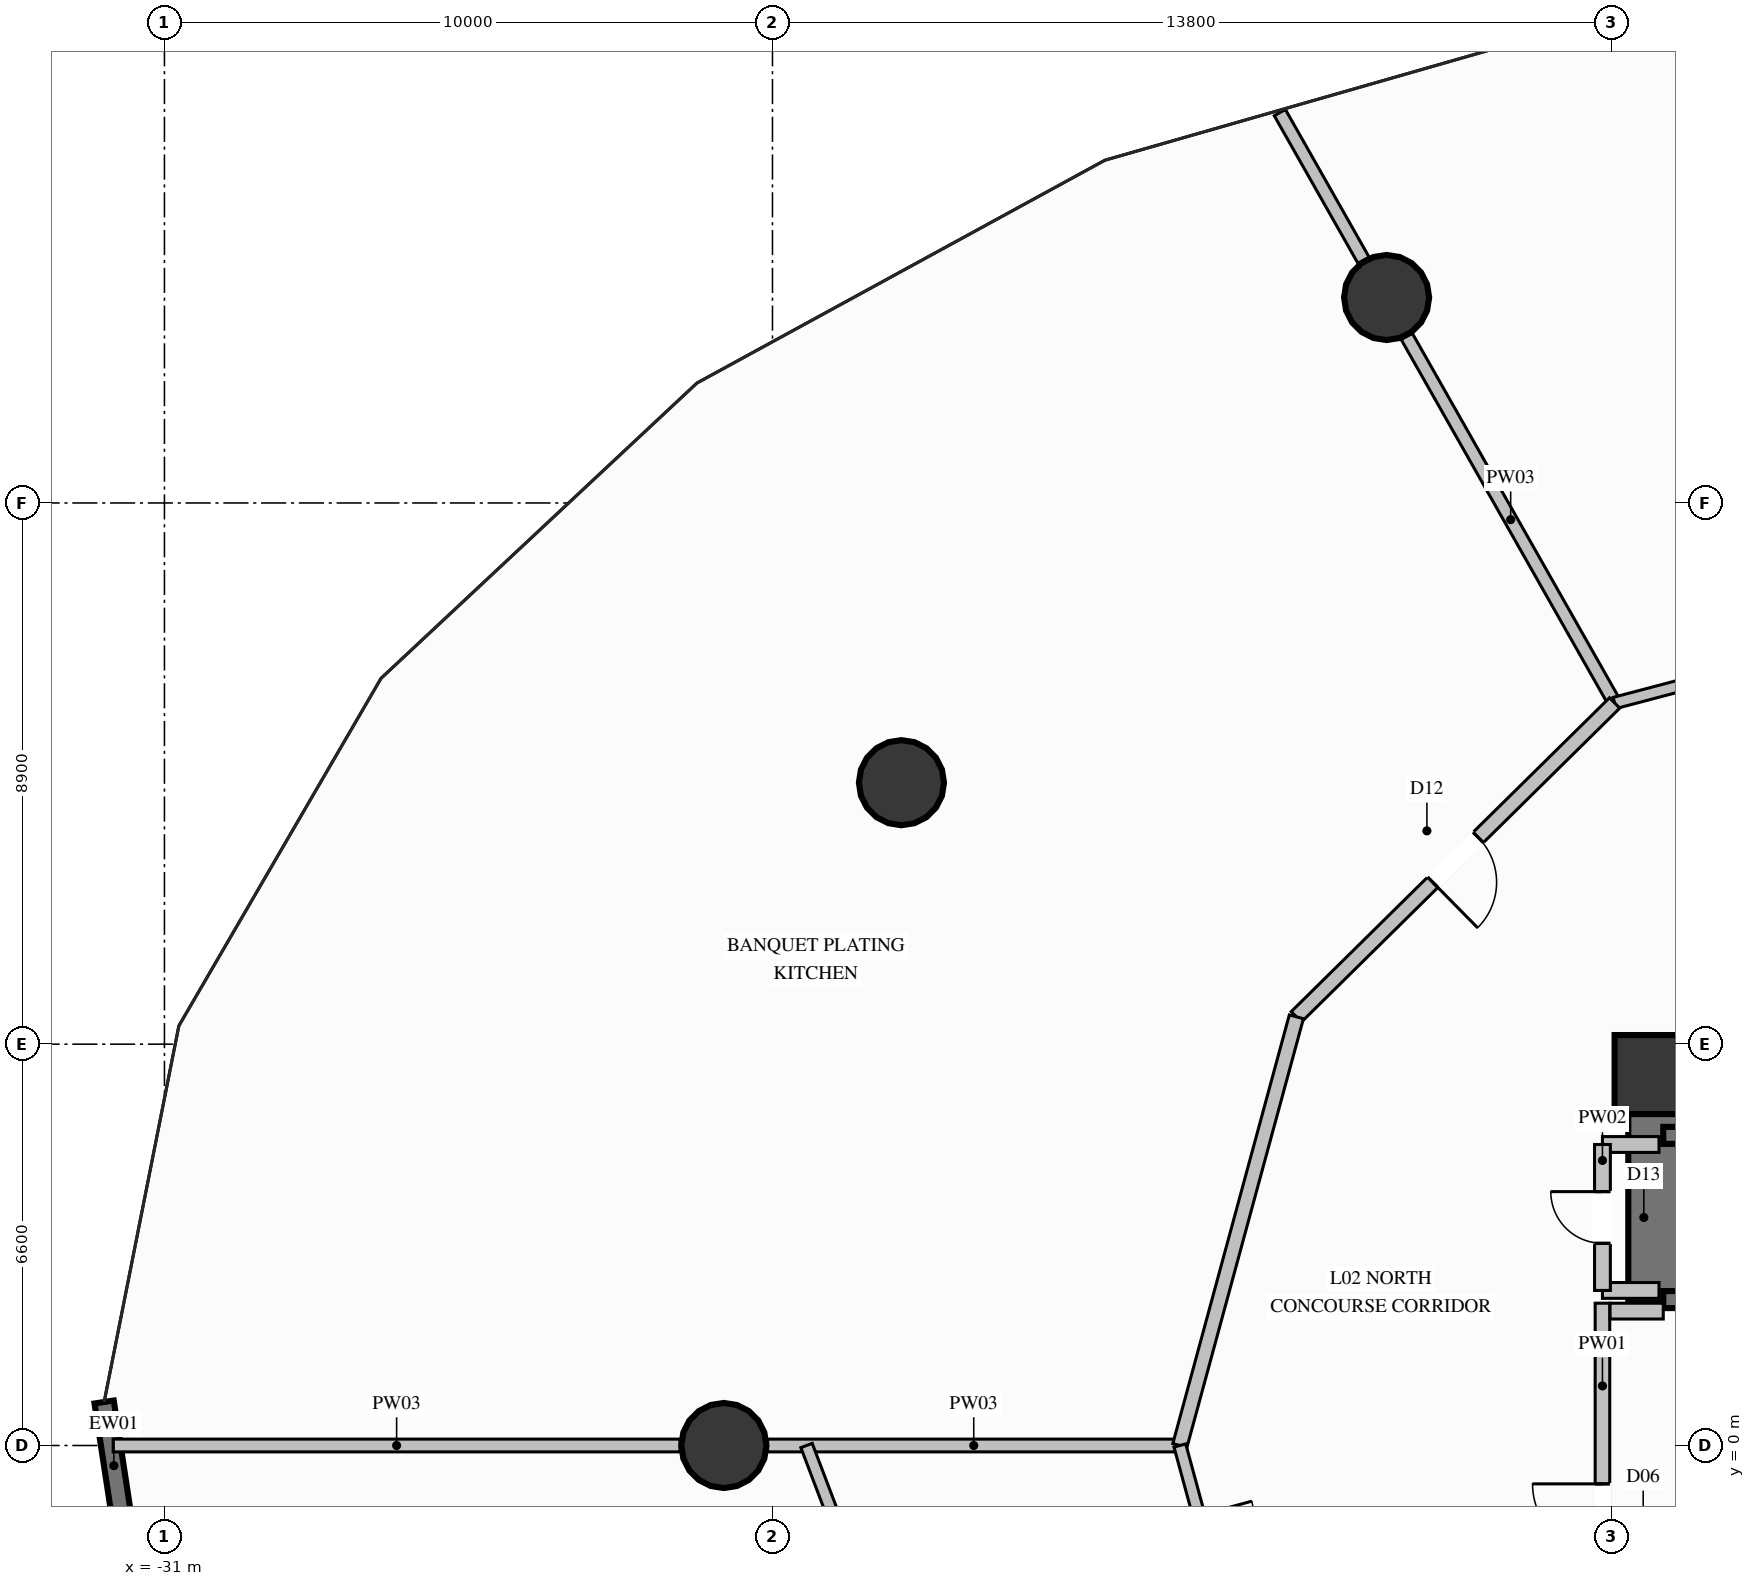
"""IFC4 building model, lengths in metres.
Left out: names, types, materials, properties, quantities, classifications, styles, units other than length and angle.
Written with IfcOpenShell. Run it as: python <this file> out.ifc"""

import sys

from ifc_helpers import new_model, si_unit, direction, frame, frame_2d, origin, origin_2d, place, context, subcontext, project, spatial, rectangle, circle, extrude, element, fill, save


model = new_model("IFC4")
c1 = context("Model", 3, precision=1e-05, world=origin(), true_north=direction((0.0, 1.0)))
c2 = subcontext(c1, "Body", "Model", "MODEL_VIEW")
j1 = project(units=[si_unit("LENGTHUNIT", "METRE"), si_unit("PLANEANGLEUNIT", "RADIAN")], contexts=[c1])
p1 = place(None, origin())
s1 = spatial("IfcSite", under=j1, at=p1, CompositionType="ELEMENT")
p2 = place(p1, origin())
s2 = spatial("IfcBuilding", under=s1, at=p2, CompositionType="ELEMENT")
p3 = place(p2, frame((0.0, 0.0, 12.6)))
s3 = spatial("IfcBuildingStorey", under=s2, at=p3, CompositionType="ELEMENT", Elevation=12.6)
p4 = place(p3, frame((-6.5, 6.1, 0.0), z_axis=(0.0, 0.0, 1.0), x_axis=(1.0, 0.0, 0.0)))
e1 = element("IfcColumn", 1, at=p4, inside=s3, PredefinedType="COLUMN", context=c2, shape_type="SweptSolid", body=[
    extrude(rectangle(XDim=1.3, YDim=1.3, at=origin_2d()), origin(), (0.0, 0.0, 1.0), 6.0),
])
p5 = place(p3, frame((-6.5, 2.35, 0.0), z_axis=(0.0, 0.0, 1.0), x_axis=(0.0, 1.0, 0.0)))
e2 = element("IfcWall", 2, at=p5, inside=s3, PredefinedType="SHEAR", context=c2, shape_type="SweptSolid", body=[
    extrude(rectangle(XDim=4.175, YDim=0.85, at=frame_2d((2.087, 0.0))), origin(), (0.0, 0.0, 1.0), 6.0),
])
for number, where, z_axis, x_axis in (
    (3, (-10.9, 18.879, 0.0), (0.0, 0.0, 1.0), (1.0, 0.0, 0.0)),
    (4, (-18.879, 10.9, 0.0), (0.0, 0.0, 1.0), (1.0, 0.0, 0.0)),
    (5, (-21.8, 0.0, 0.0), (0.0, 0.0, 1.0), (1.0, 0.0, 0.0)),
):
    element("IfcColumn", number, at=place(p3, frame(where, z_axis=z_axis, x_axis=x_axis)), inside=s3, PredefinedType="COLUMN", context=c2, shape_type="SweptSolid", body=[
        extrude(circle(Radius=0.7, at=origin_2d()), origin(), (0.0, 0.0, 1.0), 6.0),
    ])
p6 = place(p3, frame((-31.041, -5.52, 0.0), z_axis=(0.0, 0.0, 1.0), x_axis=(-0.150768496596, 0.988569097451, 0.0)))
e6 = element("IfcWall", 6, at=p6, inside=s3, PredefinedType="SOLIDWALL", context=c2, shape_type="SweptSolid", body=[
    extrude(rectangle(XDim=6.307, YDim=0.32, at=frame_2d((3.154, 0.0))), origin(), (0.0, 0.0, 1.0), 5.64),
])
p7 = place(p6, frame((1.539, 0.0, 0.65)))
e7 = element("IfcOpeningElement", 7, at=p7, cuts=e6, PredefinedType="OPENING", context=c2, shape_type="SweptSolid", body=[
    extrude(rectangle(XDim=2.4, YDim=3.2, at=frame_2d((1.2, 1.6))), frame((0.0, 0.17, 0.0), z_axis=(0.0, -1.0, 0.0), x_axis=(1.0, 0.0, 0.0)), (0.0, 0.0, 1.0), 0.34),
])
p8 = place(p3, frame((-6.35, 2.4, 0.0), z_axis=(0.0, 0.0, 1.0), x_axis=(1.0, 0.0, 0.0)))
e8 = element("IfcWall", 8, at=p8, inside=s3, PredefinedType="SOLIDWALL", context=c2, shape_type="SweptSolid", body=[
    extrude(rectangle(XDim=2.2, YDim=0.28, at=frame_2d((1.1, 0.0))), origin(), (0.0, 0.0, 1.0), 5.64),
])
p9 = place(p8, frame((0.5, 0.0, 0.0)))
e9 = element("IfcOpeningElement", 9, at=p9, cuts=e8, PredefinedType="OPENING", context=c2, shape_type="SweptSolid", body=[
    extrude(rectangle(XDim=1.2, YDim=2.2, at=frame_2d((0.6, 1.1))), frame((0.0, 0.15, 0.0), z_axis=(0.0, -1.0, 0.0), x_axis=(1.0, 0.0, 0.0)), (0.0, 0.0, 1.0), 0.3),
])
p10 = place(p3, frame((-4.15, 5.1, 0.0), z_axis=(0.0, 0.0, 1.0), x_axis=(-1.0, 0.0, 0.0)))
e10 = element("IfcWall", 10, at=p10, inside=s3, PredefinedType="SOLIDWALL", context=c2, shape_type="SweptSolid", body=[
    extrude(rectangle(XDim=2.2, YDim=0.28, at=frame_2d((1.1, 0.0))), origin(), (0.0, 0.0, 1.0), 5.64),
])
p11 = place(p3, frame((-7.35, -3.38, 0.0), z_axis=(0.0, 0.0, 1.0), x_axis=(0.0, 1.0, 0.0)))
e11 = element("IfcWall", 11, at=p11, inside=s3, PredefinedType="PARTITIONING", context=c2, shape_type="SweptSolid", body=[
    extrude(rectangle(XDim=5.72, YDim=0.24, at=frame_2d((2.86, 0.0))), origin(), (0.0, 0.0, 1.0), 4.525),
])
p12 = place(p11, frame((1.599, 0.0, 0.0)))
e12 = element("IfcOpeningElement", 12, at=p12, cuts=e11, PredefinedType="OPENING", context=c2, shape_type="SweptSolid", body=[
    extrude(rectangle(XDim=1.15, YDim=2.2, at=frame_2d((0.575, 1.1))), frame((0.0, 0.13, 0.0), z_axis=(0.0, -1.0, 0.0), x_axis=(1.0, 0.0, 0.0)), (0.0, 0.0, 1.0), 0.26),
])
p13 = place(p3, frame((-7.225, 2.21, 0.0), z_axis=(0.0, 0.0, 1.0), x_axis=(1.0, 0.0, 0.0)))
e13 = element("IfcWall", 13, at=p13, inside=s3, PredefinedType="PARTITIONING", context=c2, shape_type="SweptSolid", body=[
    extrude(rectangle(XDim=0.875, YDim=0.26, at=frame_2d((0.438, 0.0))), origin(), (0.0, 0.0, 1.0), 5.64),
])
p14 = place(p3, frame((-7.35, 4.95, 0.0), z_axis=(0.0, 0.0, 1.0), x_axis=(1.0, 0.0, 0.0)))
e14 = element("IfcWall", 14, at=p14, inside=s3, PredefinedType="PARTITIONING", context=c2, shape_type="SweptSolid", body=[
    extrude(rectangle(XDim=0.93, YDim=0.26, at=frame_2d((0.465, 0.0))), origin(), (0.0, 0.0, 1.0), 3.825),
])
p15 = place(p3, frame((-7.35, 2.55, 0.0), z_axis=(0.0, 0.0, 1.0), x_axis=(1.0, 0.0, 0.0)))
e15 = element("IfcWall", 15, at=p15, inside=s3, PredefinedType="PARTITIONING", context=c2, shape_type="SweptSolid", body=[
    extrude(rectangle(XDim=0.93, YDim=0.26, at=frame_2d((0.465, 0.0))), origin(), (0.0, 0.0, 1.0), 5.64),
])
p16 = place(p3, frame((-7.35, 2.55, 0.0), z_axis=(0.0, 0.0, 1.0), x_axis=(0.0, 1.0, 0.0)))
e16 = element("IfcWall", 16, at=p16, inside=s3, PredefinedType="PARTITIONING", context=c2, shape_type="SweptSolid", body=[
    extrude(rectangle(XDim=2.4, YDim=0.26, at=frame_2d((1.2, 0.0))), origin(), (0.0, 0.0, 1.0), 4.525),
])
p17 = place(p16, frame((0.775, 0.0, 0.0)))
e17 = element("IfcOpeningElement", 17, at=p17, cuts=e16, PredefinedType="OPENING", context=c2, shape_type="SweptSolid", body=[
    extrude(rectangle(XDim=0.85, YDim=2.05, at=frame_2d((0.425, 1.025))), frame((0.0, 0.14, 0.0), z_axis=(0.0, -1.0, 0.0), x_axis=(1.0, 0.0, 0.0)), (0.0, 0.0, 1.0), 0.28),
])
p18 = place(p3, frame((-7.15, 12.211, 0.0), z_axis=(0.0, 0.0, 1.0), x_axis=(-0.493310272192, 0.869853421762, 0.0)))
e18 = element("IfcWall", 18, at=p18, inside=s3, PredefinedType="PARTITIONING", context=c2, shape_type="SweptSolid", body=[
    extrude(rectangle(XDim=6.931, YDim=0.21, at=frame_2d((3.466, 0.0))), origin(), (0.0, 0.0, 1.0), 3.825),
])
p19 = place(p3, frame((-11.279, 19.491, 0.0), z_axis=(0.0, 0.0, 1.0), x_axis=(-0.493160381489, 0.869938410538, 0.0)))
e19 = element("IfcWall", 19, at=p19, inside=s3, PredefinedType="PARTITIONING", context=c2, shape_type="SweptSolid", body=[
    extrude(rectangle(XDim=2.792, YDim=0.21, at=frame_2d((1.396, 0.0))), origin(), (0.0, 0.0, 1.0), 5.64),
])
p20 = place(p3, frame((-14.3, 0.0, 0.0), z_axis=(0.0, 0.0, 1.0), x_axis=(-1.0, 0.0, 0.0)))
e20 = element("IfcWall", 20, at=p20, inside=s3, PredefinedType="PARTITIONING", context=c2, shape_type="SweptSolid", body=[
    extrude(rectangle(XDim=6.78, YDim=0.21, at=frame_2d((3.39, 0.0))), origin(), (0.0, 0.0, 1.0), 3.825),
])
p21 = place(p3, frame((-22.52, 0.0, 0.0), z_axis=(0.0, 0.0, 1.0), x_axis=(-1.0, 0.0, 0.0)))
e21 = element("IfcWall", 21, at=p21, inside=s3, PredefinedType="PARTITIONING", context=c2, shape_type="SweptSolid", body=[
    extrude(rectangle(XDim=9.323, YDim=0.21, at=frame_2d((4.662, 0.0))), origin(), (0.0, 0.0, 1.0), 5.64),
])
p22 = place(p3, frame((0.0, 14.1, 0.0), z_axis=(0.0, 0.0, 1.0), x_axis=(-0.966820901533, -0.255455170937, 0.0)))
e22 = element("IfcWall", 22, at=p22, inside=s3, PredefinedType="PARTITIONING", context=c2, shape_type="SweptSolid", body=[
    extrude(rectangle(XDim=7.395, YDim=0.19, at=frame_2d((3.698, 0.0))), origin(), (0.0, 0.0, 1.0), 5.64),
])
p23 = place(p3, frame((-7.15, 12.211, 0.0), z_axis=(0.0, 0.0, 1.0), x_axis=(-0.712071304345, -0.702107155303, 0.0)))
e23 = element("IfcWall", 23, at=p23, inside=s3, PredefinedType="PARTITIONING", context=c2, shape_type="SweptSolid", body=[
    extrude(rectangle(XDim=7.351, YDim=0.24, at=frame_2d((3.675, 0.0))), origin(), (0.0, 0.0, 1.0), 5.64),
])
p24 = place(p23, frame((3.15, 0.0, 0.0)))
e24 = element("IfcOpeningElement", 24, at=p24, cuts=e23, PredefinedType="OPENING", context=c2, shape_type="SweptSolid", body=[
    extrude(rectangle(XDim=1.05, YDim=2.15, at=frame_2d((0.525, 1.075))), frame((0.0, 0.13, 0.0), z_axis=(0.0, -1.0, 0.0), x_axis=(1.0, 0.0, 0.0)), (0.0, 0.0, 1.0), 0.26),
])
p25 = place(p3, frame((-12.384, 7.05, 0.0), z_axis=(0.0, 0.0, 1.0), x_axis=(-0.262260528785, -0.964997106235, 0.0)))
e25 = element("IfcWall", 25, at=p25, inside=s3, PredefinedType="PARTITIONING", context=c2, shape_type="SweptSolid", body=[
    extrude(rectangle(XDim=7.306, YDim=0.24, at=frame_2d((3.653, 0.0))), origin(), (0.0, 0.0, 1.0), 5.64),
])
p26 = place(p3, frame((-14.3, 0.0, 0.0), z_axis=(0.0, 0.0, 1.0), x_axis=(0.262250045558, -0.964999955236, 0.0)))
e26 = element("IfcWall", 26, at=p26, inside=s3, PredefinedType="PLUMBINGWALL", context=c2, shape_type="SweptSolid", body=[
    extrude(rectangle(XDim=3.287, YDim=0.2, at=frame_2d((1.644, 0.0))), origin(), (0.0, 0.0, 1.0), 5.64),
])
p27 = place(p26, frame((1.194, 0.0, 0.0)))
e27 = element("IfcOpeningElement", 27, at=p27, cuts=e26, PredefinedType="OPENING", context=c2, shape_type="SweptSolid", body=[
    extrude(rectangle(XDim=0.9, YDim=2.1, at=frame_2d((0.45, 1.05))), frame((0.0, 0.11, 0.0), z_axis=(0.0, -1.0, 0.0), x_axis=(1.0, 0.0, 0.0)), (0.0, 0.0, 1.0), 0.22),
])
p28 = place(p3, frame((-20.44, 0.0, 0.0), z_axis=(0.0, 0.0, 1.0), x_axis=(0.355070404359, -0.934839562678, 0.0)))
e28 = element("IfcWall", 28, at=p28, inside=s3, PredefinedType="PLUMBINGWALL", context=c2, shape_type="SweptSolid", body=[
    extrude(rectangle(XDim=4.633, YDim=0.2, at=frame_2d((2.316, 0.0))), origin(), (0.0, 0.0, 1.0), 5.64),
])
p29 = place(p12, origin())
e29 = element("IfcDoor", 29, at=p29, inside=s3, OperationType="SINGLE_SWING_RIGHT", PredefinedType="DOOR", context=c2, shape_type="SweptSolid", body=[
    extrude(rectangle(XDim=1.15, YDim=2.2, at=frame_2d((0.575, 1.1))), frame((0.0, 0.025, 0.0), z_axis=(0.0, -1.0, 0.0), x_axis=(1.0, 0.0, 0.0)), (0.0, 0.0, 1.0), 0.05),
])
fill(e12, e29)
p30 = place(p17, origin())
e30 = element("IfcDoor", 30, at=p30, inside=s3, OperationType="SINGLE_SWING_RIGHT", PredefinedType="DOOR", context=c2, shape_type="SweptSolid", body=[
    extrude(rectangle(XDim=0.85, YDim=2.05, at=frame_2d((0.425, 1.025))), frame((0.0, 0.025, 0.0), z_axis=(0.0, -1.0, 0.0), x_axis=(1.0, 0.0, 0.0)), (0.0, 0.0, 1.0), 0.05),
])
fill(e17, e30)
p31 = place(p24, origin())
e31 = element("IfcDoor", 31, at=p31, inside=s3, OperationType="SINGLE_SWING_RIGHT", PredefinedType="DOOR", context=c2, shape_type="SweptSolid", body=[
    extrude(rectangle(XDim=1.05, YDim=2.15, at=frame_2d((0.525, 1.075))), frame((0.0, 0.025, 0.0), z_axis=(0.0, -1.0, 0.0), x_axis=(1.0, 0.0, 0.0)), (0.0, 0.0, 1.0), 0.05),
])
fill(e24, e31)
save(model, sys.argv[1])
